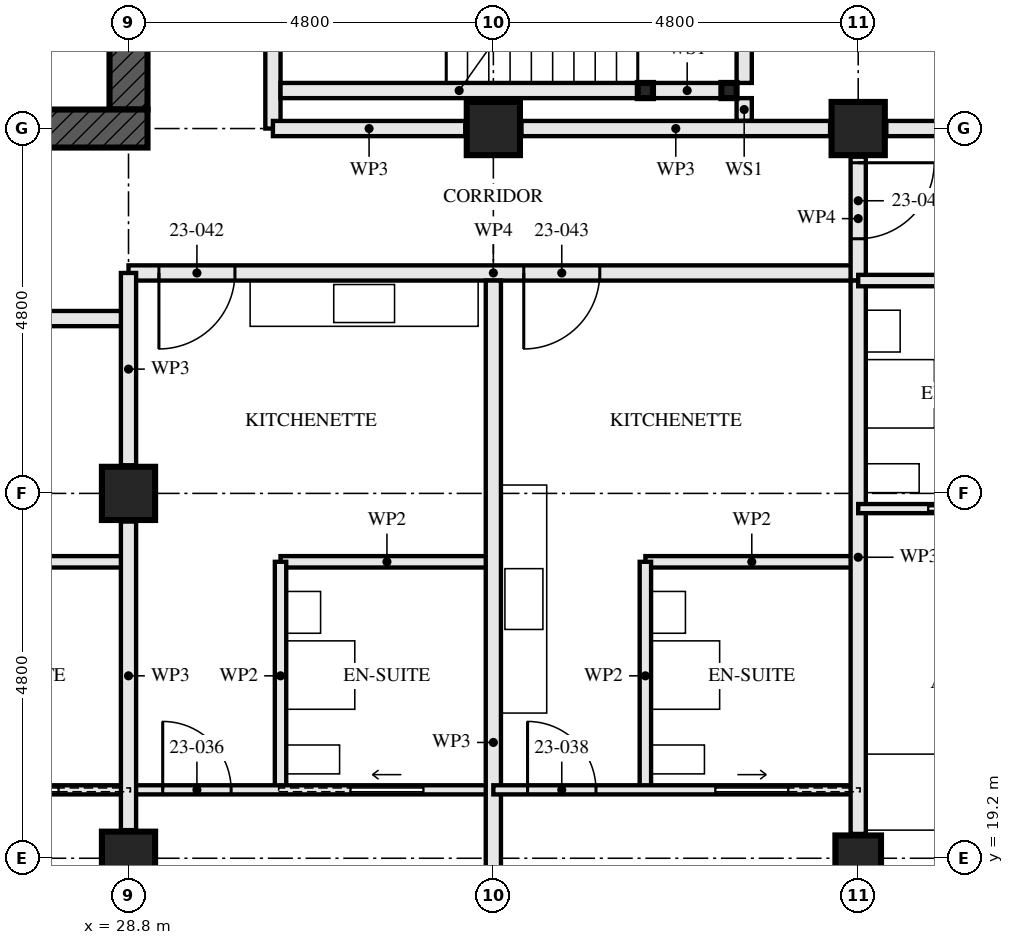
"""IFC4 building model, lengths in metres.
Left out: names, types, materials, properties, quantities, classifications, styles, units other than length and angle.
Written with IfcOpenShell. Run it as: python <this file> out.ifc"""

import sys

from ifc_helpers import new_model, si_unit, direction, frame, frame_2d, origin, origin_2d, place, context, subcontext, project, spatial, rectangle, hollow_rectangle, extrude, element, fill, save


model = new_model("IFC4")
c1 = context("Model", 3, precision=1e-05, world=origin(), true_north=direction((0.0, 1.0)))
c2 = subcontext(c1, "Body", "Model", "MODEL_VIEW")
j1 = project(units=[si_unit("LENGTHUNIT", "METRE"), si_unit("PLANEANGLEUNIT", "RADIAN")], contexts=[c1])
p1 = place(None, origin())
s1 = spatial("IfcSite", under=j1, at=p1, CompositionType="ELEMENT")
p2 = place(p1, origin())
s2 = spatial("IfcBuilding", under=s1, at=p2, CompositionType="ELEMENT")
p3 = place(p2, frame((0.0, 0.0, 87.5)))
s3 = spatial("IfcBuildingStorey", under=s2, at=p3, CompositionType="ELEMENT", Elevation=87.5)
for number, where, z_axis, x_axis in (
    (1, (28.8, 19.2, 0.0), (0.0, 0.0, 1.0), (1.0, 0.0, 0.0)),
    (2, (28.8, 24.0, 0.0), (0.0, 0.0, 1.0), (1.0, 0.0, 0.0)),
    (3, (33.6, 28.8, 0.0), (0.0, 0.0, 1.0), (0.0, 1.0, 0.0)),
):
    element("IfcColumn", number, at=place(p3, frame(where, z_axis=z_axis, x_axis=x_axis)), inside=s3, PredefinedType="COLUMN", context=c2, shape_type="SweptSolid", body=[
        extrude(hollow_rectangle(XDim=0.7, YDim=0.7, WallThickness=0.06, at=origin_2d()), origin(), (0.0, 0.0, 1.0), 3.5),
    ])
p4 = place(p3, frame((38.4, 19.2, 0.0), z_axis=(0.0, 0.0, 1.0), x_axis=(0.0, 1.0, 0.0)))
e4 = element("IfcColumn", 4, at=p4, inside=s3, PredefinedType="COLUMN", context=c2, shape_type="SweptSolid", body=[
    extrude(hollow_rectangle(XDim=0.6, YDim=0.6, WallThickness=0.05, at=origin_2d()), origin(), (0.0, 0.0, 1.0), 3.5),
])
p5 = place(p3, frame((38.4, 28.8, 0.0), z_axis=(0.0, 0.0, 1.0), x_axis=(0.0, 1.0, 0.0)))
e5 = element("IfcColumn", 5, at=p5, inside=s3, PredefinedType="COLUMN", context=c2, shape_type="SweptSolid", body=[
    extrude(hollow_rectangle(XDim=0.7, YDim=0.7, WallThickness=0.06, at=origin_2d()), origin(), (0.0, 0.0, 1.0), 3.5),
])
p6 = place(p3, frame((14.15, 28.8, -0.17), z_axis=(0.0, 0.0, 1.0), x_axis=(1.0, 0.0, 0.0)))
e6 = element("IfcWall", 6, at=p6, inside=s3, PredefinedType="SHEAR", context=c2, shape_type="SweptSolid", body=[
    extrude(rectangle(XDim=14.9, YDim=0.5, at=frame_2d((7.45, 0.0))), origin(), (0.0, 0.0, 1.0), 3.5),
])
p7 = place(p6, frame((6.85, 0.0, 0.17)))
e7 = element("IfcOpeningElement", 7, at=p7, cuts=e6, PredefinedType="OPENING", context=c2, shape_type="SweptSolid", body=[
    extrude(rectangle(XDim=1.2, YDim=2.1, at=frame_2d((0.6, 1.05))), frame((0.0, 0.26, 0.0), z_axis=(0.0, -1.0, 0.0), x_axis=(1.0, 0.0, 0.0)), (0.0, 0.0, 1.0), 0.521),
])
p8 = place(p3, frame((28.8, 29.05, -0.17), z_axis=(0.0, 0.0, 1.0), x_axis=(0.0, 1.0, 0.0)))
e8 = element("IfcWall", 8, at=p8, inside=s3, PredefinedType="SHEAR", context=c2, shape_type="SweptSolid", body=[
    extrude(rectangle(XDim=13.9, YDim=0.5, at=frame_2d((6.95, 0.0))), origin(), (0.0, 0.0, 1.0), 3.5),
])
p9 = place(p8, frame((6.35, 0.0, 0.17)))
e9 = element("IfcOpeningElement", 9, at=p9, cuts=e8, PredefinedType="OPENING", context=c2, shape_type="SweptSolid", body=[
    extrude(rectangle(XDim=1.2, YDim=2.1, at=frame_2d((0.6, 1.05))), frame((0.0, 0.26, 0.0), z_axis=(0.0, -1.0, 0.0), x_axis=(1.0, 0.0, 0.0)), (0.0, 0.0, 1.0), 0.521),
])
for number, where, z_axis, x_axis in (
    (10, (36.7, 29.3, 0.0), (0.0, 0.0, 1.0), (1.0, 0.0, 0.0)),
    (11, (35.6, 29.3, 0.0), (0.0, 0.0, 1.0), (1.0, 0.0, 0.0)),
):
    element("IfcColumn", number, at=place(p3, frame(where, z_axis=z_axis, x_axis=x_axis)), inside=s3, PredefinedType="COLUMN", context=c2, shape_type="SweptSolid", body=[
        extrude(hollow_rectangle(XDim=0.2, YDim=0.2, WallThickness=0.008, at=origin_2d()), origin(), (0.0, 0.0, 1.0), 3.33),
    ])
p10 = place(p3, frame((26.0, 23.1, 0.0), z_axis=(0.0, 0.0, 1.0), x_axis=(1.0, 0.0, 0.0)))
e12 = element("IfcWall", 12, at=p10, inside=s3, PredefinedType="PARTITIONING", context=c2, shape_type="SweptSolid", body=[
    extrude(rectangle(XDim=2.8, YDim=0.15, at=frame_2d((1.4, 0.0))), origin(), (0.0, 0.0, 1.0), 3.33),
])
p11 = place(p3, frame((24.0, 20.1, 0.0), z_axis=(0.0, 0.0, 1.0), x_axis=(1.0, 0.0, 0.0)))
e13 = element("IfcWall", 13, at=p11, inside=s3, PredefinedType="PARTITIONING", context=c2, shape_type="SweptSolid", body=[
    extrude(rectangle(XDim=4.8, YDim=0.12, at=frame_2d((2.4, 0.0))), origin(), (0.0, 0.0, 1.0), 3.33),
])
p12 = place(p11, frame((0.45, 0.0, 0.0)))
e14 = element("IfcOpeningElement", 14, at=p12, cuts=e13, PredefinedType="OPENING", context=c2, shape_type="SweptSolid", body=[
    extrude(rectangle(XDim=0.9, YDim=2.1, at=frame_2d((0.45, 1.05))), frame((0.0, 0.071, 0.0), z_axis=(0.0, -1.0, 0.0), x_axis=(1.0, 0.0, 0.0)), (0.0, 0.0, 1.0), 0.141),
])
p13 = place(p11, frame((2.925, 0.0, 0.0)))
e15 = element("IfcOpeningElement", 15, at=p13, cuts=e13, PredefinedType="OPENING", context=c2, shape_type="SweptSolid", body=[
    extrude(rectangle(XDim=0.95, YDim=2.1, at=frame_2d((0.475, 1.05))), frame((0.0, 0.071, 0.0), z_axis=(0.0, -1.0, 0.0), x_axis=(1.0, 0.0, 0.0)), (0.0, 0.0, 1.0), 0.141),
])
p14 = place(p3, frame((17.8, 26.3, 0.0), z_axis=(0.0, 0.0, 1.0), x_axis=(1.0, 0.0, 0.0)))
e16 = element("IfcWall", 16, at=p14, inside=s3, PredefinedType="PARTITIONING", context=c2, shape_type="SweptSolid", body=[
    extrude(rectangle(XDim=11.0, YDim=0.2, at=frame_2d((5.5, 0.0))), origin(), (0.0, 0.0, 1.0), 2.55),
])
p15 = place(p14, frame((0.25, 0.0, 0.0)))
e17 = element("IfcOpeningElement", 17, at=p15, cuts=e16, PredefinedType="OPENING", context=c2, shape_type="SweptSolid", body=[
    extrude(rectangle(XDim=0.9, YDim=2.1, at=frame_2d((0.45, 1.05))), frame((0.0, 0.111, 0.0), z_axis=(0.0, -1.0, 0.0), x_axis=(1.0, 0.0, 0.0)), (0.0, 0.0, 1.0), 0.221),
])
p16 = place(p14, frame((1.8, 0.0, 0.0)))
e18 = element("IfcOpeningElement", 18, at=p16, cuts=e16, PredefinedType="OPENING", context=c2, shape_type="SweptSolid", body=[
    extrude(rectangle(XDim=1.0, YDim=2.1, at=frame_2d((0.5, 1.05))), frame((0.0, 0.111, 0.0), z_axis=(0.0, -1.0, 0.0), x_axis=(1.0, 0.0, 0.0)), (0.0, 0.0, 1.0), 0.221),
])
p17 = place(p14, frame((6.6, 0.0, 0.0)))
e19 = element("IfcOpeningElement", 19, at=p17, cuts=e16, PredefinedType="OPENING", context=c2, shape_type="SweptSolid", body=[
    extrude(rectangle(XDim=1.0, YDim=2.1, at=frame_2d((0.5, 1.05))), frame((0.0, 0.111, 0.0), z_axis=(0.0, -1.0, 0.0), x_axis=(1.0, 0.0, 0.0)), (0.0, 0.0, 1.0), 0.221),
])
p18 = place(p3, frame((30.8, 20.1, 0.0), z_axis=(0.0, 0.0, 1.0), x_axis=(0.0, 1.0, 0.0)))
e20 = element("IfcWall", 20, at=p18, inside=s3, PredefinedType="PARTITIONING", context=c2, shape_type="SweptSolid", body=[
    extrude(rectangle(XDim=3.0, YDim=0.15, at=frame_2d((1.5, 0.0))), origin(), (0.0, 0.0, 1.0), 3.33),
])
p19 = place(p3, frame((30.8, 23.1, 0.0), z_axis=(0.0, 0.0, 1.0), x_axis=(1.0, 0.0, 0.0)))
e21 = element("IfcWall", 21, at=p19, inside=s3, PredefinedType="PARTITIONING", context=c2, shape_type="SweptSolid", body=[
    extrude(rectangle(XDim=2.8, YDim=0.15, at=frame_2d((1.4, 0.0))), origin(), (0.0, 0.0, 1.0), 3.33),
])
p20 = place(p3, frame((28.8, 20.1, 0.0), z_axis=(0.0, 0.0, 1.0), x_axis=(1.0, 0.0, 0.0)))
e22 = element("IfcWall", 22, at=p20, inside=s3, PredefinedType="PARTITIONING", context=c2, shape_type="SweptSolid", body=[
    extrude(rectangle(XDim=4.8, YDim=0.12, at=frame_2d((2.4, 0.0))), origin(), (0.0, 0.0, 1.0), 3.33),
])
p21 = place(p20, frame((0.45, 0.0, 0.0)))
e23 = element("IfcOpeningElement", 23, at=p21, cuts=e22, PredefinedType="OPENING", context=c2, shape_type="SweptSolid", body=[
    extrude(rectangle(XDim=0.9, YDim=2.1, at=frame_2d((0.45, 1.05))), frame((0.0, 0.071, 0.0), z_axis=(0.0, -1.0, 0.0), x_axis=(1.0, 0.0, 0.0)), (0.0, 0.0, 1.0), 0.141),
])
p22 = place(p20, frame((2.925, 0.0, 0.0)))
e24 = element("IfcOpeningElement", 24, at=p22, cuts=e22, PredefinedType="OPENING", context=c2, shape_type="SweptSolid", body=[
    extrude(rectangle(XDim=0.95, YDim=2.1, at=frame_2d((0.475, 1.05))), frame((0.0, 0.071, 0.0), z_axis=(0.0, -1.0, 0.0), x_axis=(1.0, 0.0, 0.0)), (0.0, 0.0, 1.0), 0.141),
])
p23 = place(p3, frame((33.6, 14.647, 0.0), z_axis=(0.0, 0.0, 1.0), x_axis=(0.0, 1.0, 0.0)))
e25 = element("IfcWall", 25, at=p23, inside=s3, PredefinedType="PARTITIONING", context=c2, shape_type="SweptSolid", body=[
    extrude(rectangle(XDim=12.153, YDim=0.2, at=frame_2d((6.077, 0.0))), origin(), (0.0, 0.0, 1.0), 2.55),
])
p24 = place(p3, frame((35.6, 20.1, 0.0), z_axis=(0.0, 0.0, 1.0), x_axis=(0.0, 1.0, 0.0)))
e26 = element("IfcWall", 26, at=p24, inside=s3, PredefinedType="PARTITIONING", context=c2, shape_type="SweptSolid", body=[
    extrude(rectangle(XDim=3.0, YDim=0.15, at=frame_2d((1.5, 0.0))), origin(), (0.0, 0.0, 1.0), 3.33),
])
p25 = place(p3, frame((35.6, 23.1, 0.0), z_axis=(0.0, 0.0, 1.0), x_axis=(1.0, 0.0, 0.0)))
e27 = element("IfcWall", 27, at=p25, inside=s3, PredefinedType="PARTITIONING", context=c2, shape_type="SweptSolid", body=[
    extrude(rectangle(XDim=2.8, YDim=0.15, at=frame_2d((1.4, 0.0))), origin(), (0.0, 0.0, 1.0), 3.33),
])
p26 = place(p3, frame((33.6, 20.1, 0.0), z_axis=(0.0, 0.0, 1.0), x_axis=(1.0, 0.0, 0.0)))
e28 = element("IfcWall", 28, at=p26, inside=s3, PredefinedType="PARTITIONING", context=c2, shape_type="SweptSolid", body=[
    extrude(rectangle(XDim=4.8, YDim=0.12, at=frame_2d((2.4, 0.0))), origin(), (0.0, 0.0, 1.0), 3.33),
])
p27 = place(p26, frame((0.45, 0.0, 0.0)))
e29 = element("IfcOpeningElement", 29, at=p27, cuts=e28, PredefinedType="OPENING", context=c2, shape_type="SweptSolid", body=[
    extrude(rectangle(XDim=0.9, YDim=2.1, at=frame_2d((0.45, 1.05))), frame((0.0, 0.071, 0.0), z_axis=(0.0, -1.0, 0.0), x_axis=(1.0, 0.0, 0.0)), (0.0, 0.0, 1.0), 0.141),
])
p28 = place(p26, frame((2.925, 0.0, 0.0)))
e30 = element("IfcOpeningElement", 30, at=p28, cuts=e28, PredefinedType="OPENING", context=c2, shape_type="SweptSolid", body=[
    extrude(rectangle(XDim=0.95, YDim=2.1, at=frame_2d((0.475, 1.05))), frame((0.0, 0.071, 0.0), z_axis=(0.0, -1.0, 0.0), x_axis=(1.0, 0.0, 0.0)), (0.0, 0.0, 1.0), 0.141),
])
p29 = place(p3, frame((38.4, 19.52, 0.0), z_axis=(0.0, 0.0, 1.0), x_axis=(0.0, 1.0, 0.0)))
e31 = element("IfcWall", 31, at=p29, inside=s3, PredefinedType="PARTITIONING", context=c2, shape_type="SweptSolid", body=[
    extrude(rectangle(XDim=7.28, YDim=0.2, at=frame_2d((3.64, 0.0))), origin(), (0.0, 0.0, 1.0), 2.55),
])
p30 = place(p3, frame((38.4, 26.8, 0.0), z_axis=(0.0, 0.0, 1.0), x_axis=(1.0, 0.0, 0.0)))
e32 = element("IfcWall", 32, at=p30, inside=s3, PredefinedType="PARTITIONING", context=c2, shape_type="SweptSolid", body=[
    extrude(rectangle(XDim=2.8, YDim=0.15, at=frame_2d((1.4, 0.0))), origin(), (0.0, 0.0, 1.0), 3.33),
])
p31 = place(p3, frame((38.4, 23.8, 0.0), z_axis=(0.0, 0.0, 1.0), x_axis=(1.0, 0.0, 0.0)))
e33 = element("IfcWall", 33, at=p31, inside=s3, PredefinedType="PARTITIONING", context=c2, shape_type="SweptSolid", body=[
    extrude(rectangle(XDim=4.553, YDim=0.12, at=frame_2d((2.276, 0.0))), origin(), (0.0, 0.0, 1.0), 3.33),
])
p32 = place(p31, frame((2.975, 0.0, 0.0)))
e34 = element("IfcOpeningElement", 34, at=p32, cuts=e33, PredefinedType="OPENING", context=c2, shape_type="SweptSolid", body=[
    extrude(rectangle(XDim=0.9, YDim=2.1, at=frame_2d((0.45, 1.05))), frame((0.0, 0.071, 0.0), z_axis=(0.0, -1.0, 0.0), x_axis=(1.0, 0.0, 0.0)), (0.0, 0.0, 1.0), 0.141),
])
p33 = place(p31, frame((0.925, 0.0, 0.0)))
e35 = element("IfcOpeningElement", 35, at=p33, cuts=e33, PredefinedType="OPENING", context=c2, shape_type="SweptSolid", body=[
    extrude(rectangle(XDim=0.95, YDim=2.1, at=frame_2d((0.475, 1.05))), frame((0.0, 0.071, 0.0), z_axis=(0.0, -1.0, 0.0), x_axis=(1.0, 0.0, 0.0)), (0.0, 0.0, 1.0), 0.141),
])
p34 = place(p3, frame((28.8, 26.9, 0.0), z_axis=(0.0, 0.0, 1.0), x_axis=(1.0, 0.0, 0.0)))
e36 = element("IfcWall", 36, at=p34, inside=s3, PredefinedType="PARTITIONING", context=c2, shape_type="SweptSolid", body=[
    extrude(rectangle(XDim=9.6, YDim=0.2, at=frame_2d((4.8, 0.0))), origin(), (0.0, 0.0, 1.0), 3.33),
])
p35 = place(p34, frame((0.4, 0.0, 0.0)))
e37 = element("IfcOpeningElement", 37, at=p35, cuts=e36, PredefinedType="OPENING", context=c2, shape_type="SweptSolid", body=[
    extrude(rectangle(XDim=1.0, YDim=2.1, at=frame_2d((0.5, 1.05))), frame((0.0, 0.111, 0.0), z_axis=(0.0, -1.0, 0.0), x_axis=(1.0, 0.0, 0.0)), (0.0, 0.0, 1.0), 0.221),
])
p36 = place(p34, frame((5.2, 0.0, 0.0)))
e38 = element("IfcOpeningElement", 38, at=p36, cuts=e36, PredefinedType="OPENING", context=c2, shape_type="SweptSolid", body=[
    extrude(rectangle(XDim=1.0, YDim=2.1, at=frame_2d((0.5, 1.05))), frame((0.0, 0.111, 0.0), z_axis=(0.0, -1.0, 0.0), x_axis=(1.0, 0.0, 0.0)), (0.0, 0.0, 1.0), 0.221),
])
p37 = place(p3, frame((38.4, 26.8, 0.0), z_axis=(0.0, 0.0, 1.0), x_axis=(0.0, 1.0, 0.0)))
e39 = element("IfcWall", 39, at=p37, inside=s3, PredefinedType="PARTITIONING", context=c2, shape_type="SweptSolid", body=[
    extrude(rectangle(XDim=1.63, YDim=0.2, at=frame_2d((0.815, 0.0))), origin(), (0.0, 0.0, 1.0), 3.33),
])
p38 = place(p37, frame((0.55, 0.0, 0.0)))
e40 = element("IfcOpeningElement", 40, at=p38, cuts=e39, PredefinedType="OPENING", context=c2, shape_type="SweptSolid", body=[
    extrude(rectangle(XDim=1.0, YDim=2.1, at=frame_2d((0.5, 1.05))), frame((0.0, 0.111, 0.0), z_axis=(0.0, -1.0, 0.0), x_axis=(1.0, 0.0, 0.0)), (0.0, 0.0, 1.0), 0.221),
])
p39 = place(p3, frame((36.6, 29.3, 0.0), z_axis=(0.0, 0.0, 1.0), x_axis=(-1.0, 0.0, 0.0)))
e41 = element("IfcWall", 41, at=p39, inside=s3, PredefinedType="SOLIDWALL", context=c2, shape_type="SweptSolid", body=[
    extrude(rectangle(XDim=0.9, YDim=0.2, at=frame_2d((0.45, 0.0))), origin(), (0.0, 0.0, 1.0), 2.99),
])
p40 = place(p3, frame((35.5, 29.3, 0.0), z_axis=(0.0, 0.0, 1.0), x_axis=(-1.0, 0.0, 0.0)))
e42 = element("IfcWall", 42, at=p40, inside=s3, PredefinedType="SOLIDWALL", context=c2, shape_type="SweptSolid", body=[
    extrude(rectangle(XDim=4.7, YDim=0.2, at=frame_2d((2.35, 0.0))), origin(), (0.0, 0.0, 1.0), 2.99),
])
p41 = place(p3, frame((36.9, 28.9, 0.0), z_axis=(0.0, 0.0, 1.0), x_axis=(0.0, 1.0, 0.0)))
e43 = element("IfcWall", 43, at=p41, inside=s3, PredefinedType="SOLIDWALL", context=c2, shape_type="SweptSolid", body=[
    extrude(rectangle(XDim=0.3, YDim=0.2, at=frame_2d((0.15, 0.0))), origin(), (0.0, 0.0, 1.0), 3.33),
])
p42 = place(p3, frame((36.9, 29.4, 0.0), z_axis=(0.0, 0.0, 1.0), x_axis=(0.0, 1.0, 0.0)))
e44 = element("IfcWall", 44, at=p42, inside=s3, PredefinedType="SOLIDWALL", context=c2, shape_type="SweptSolid", body=[
    extrude(rectangle(XDim=2.6, YDim=0.2, at=frame_2d((1.3, 0.0))), origin(), (0.0, 0.0, 1.0), 3.33),
])
p43 = place(p3, frame((30.7, 28.8, 0.0), z_axis=(0.0, 0.0, 1.0), x_axis=(0.0, 1.0, 0.0)))
e45 = element("IfcWall", 45, at=p43, inside=s3, PredefinedType="PARTITIONING", context=c2, shape_type="SweptSolid", body=[
    extrude(rectangle(XDim=14.84, YDim=0.2, at=frame_2d((7.42, 0.0))), origin(), (0.0, 0.0, 1.0), 2.32),
])
p44 = place(p43, frame((1.4, 0.0, 0.0)))
e46 = element("IfcOpeningElement", 46, at=p44, cuts=e45, PredefinedType="OPENING", context=c2, shape_type="SweptSolid", body=[
    extrude(rectangle(XDim=1.0, YDim=2.1, at=frame_2d((0.5, 1.05))), frame((0.0, 0.111, 0.0), z_axis=(0.0, -1.0, 0.0), x_axis=(1.0, 0.0, 0.0)), (0.0, 0.0, 1.0), 0.221),
])
p45 = place(p43, frame((4.1, 0.0, 0.0)))
e47 = element("IfcOpeningElement", 47, at=p45, cuts=e45, PredefinedType="OPENING", context=c2, shape_type="SweptSolid", body=[
    extrude(rectangle(XDim=1.0, YDim=2.1, at=frame_2d((0.5, 1.05))), frame((0.0, 0.111, 0.0), z_axis=(0.0, -1.0, 0.0), x_axis=(1.0, 0.0, 0.0)), (0.0, 0.0, 1.0), 0.221),
])
p46 = place(p43, frame((5.975, 0.0, 0.0)))
e48 = element("IfcOpeningElement", 48, at=p46, cuts=e45, PredefinedType="OPENING", context=c2, shape_type="SweptSolid", body=[
    extrude(rectangle(XDim=1.0, YDim=2.1, at=frame_2d((0.5, 1.05))), frame((0.0, 0.111, 0.0), z_axis=(0.0, -1.0, 0.0), x_axis=(1.0, 0.0, 0.0)), (0.0, 0.0, 1.0), 0.221),
])
p47 = place(p43, frame((13.0, 0.0, 0.0)))
e49 = element("IfcOpeningElement", 49, at=p47, cuts=e45, PredefinedType="OPENING", context=c2, shape_type="SweptSolid", body=[
    extrude(rectangle(XDim=1.0, YDim=2.1, at=frame_2d((0.5, 1.05))), frame((0.0, 0.111, 0.0), z_axis=(0.0, -1.0, 0.0), x_axis=(1.0, 0.0, 0.0)), (0.0, 0.0, 1.0), 0.221),
])
p48 = place(p3, frame((28.8, 19.57, 0.0), z_axis=(0.0, 0.0, 1.0), x_axis=(0.0, 1.0, 0.0)))
e50 = element("IfcWall", 50, at=p48, inside=s3, PredefinedType="PARTITIONING", context=c2, shape_type="SweptSolid", body=[
    extrude(rectangle(XDim=4.06, YDim=0.2, at=frame_2d((2.03, 0.0))), origin(), (0.0, 0.0, 1.0), 2.32),
])
p49 = place(p3, frame((28.8, 24.37, 0.0), z_axis=(0.0, 0.0, 1.0), x_axis=(0.0, 1.0, 0.0)))
e51 = element("IfcWall", 51, at=p49, inside=s3, PredefinedType="PARTITIONING", context=c2, shape_type="SweptSolid", body=[
    extrude(rectangle(XDim=2.53, YDim=0.2, at=frame_2d((1.265, 0.0))), origin(), (0.0, 0.0, 1.0), 2.32),
])
p50 = place(p3, frame((42.896, 28.8, 0.0), z_axis=(0.0, 0.0, 1.0), x_axis=(-1.0, 0.0, 0.0)))
e52 = element("IfcWall", 52, at=p50, inside=s3, PredefinedType="PARTITIONING", context=c2, shape_type="SweptSolid", body=[
    extrude(rectangle(XDim=4.125, YDim=0.2, at=frame_2d((2.063, 0.0))), origin(), (0.0, 0.0, 1.0), 2.32),
])
p51 = place(p3, frame((38.03, 28.8, 0.0), z_axis=(0.0, 0.0, 1.0), x_axis=(-1.0, 0.0, 0.0)))
e53 = element("IfcWall", 53, at=p51, inside=s3, PredefinedType="PARTITIONING", context=c2, shape_type="SweptSolid", body=[
    extrude(rectangle(XDim=4.06, YDim=0.2, at=frame_2d((2.03, 0.0))), origin(), (0.0, 0.0, 1.0), 2.32),
])
p52 = place(p3, frame((33.23, 28.8, 0.0), z_axis=(0.0, 0.0, 1.0), x_axis=(-1.0, 0.0, 0.0)))
e54 = element("IfcWall", 54, at=p52, inside=s3, PredefinedType="PARTITIONING", context=c2, shape_type="SweptSolid", body=[
    extrude(rectangle(XDim=2.53, YDim=0.2, at=frame_2d((1.265, 0.0))), origin(), (0.0, 0.0, 1.0), 2.32),
])
p53 = place(p13, origin())
e55 = element("IfcDoor", 55, at=p53, inside=s3, OperationType="SLIDING_TO_LEFT", PredefinedType="DOOR", context=c2, shape_type="SweptSolid", body=[
    extrude(rectangle(XDim=0.95, YDim=2.1, at=frame_2d((0.475, 1.05))), frame((0.0, 0.022, 0.0), z_axis=(0.0, -1.0, 0.0), x_axis=(1.0, 0.0, 0.0)), (0.0, 0.0, 1.0), 0.044),
])
fill(e15, e55)
p54 = place(p21, origin())
e56 = element("IfcDoor", 56, at=p54, inside=s3, OperationType="SINGLE_SWING_RIGHT", PredefinedType="DOOR", context=c2, shape_type="SweptSolid", body=[
    extrude(rectangle(XDim=0.9, YDim=2.1, at=frame_2d((0.45, 1.05))), frame((0.0, 0.022, 0.0), z_axis=(0.0, -1.0, 0.0), x_axis=(1.0, 0.0, 0.0)), (0.0, 0.0, 1.0), 0.044),
])
fill(e23, e56)
p55 = place(p22, origin())
e57 = element("IfcDoor", 57, at=p55, inside=s3, OperationType="SLIDING_TO_RIGHT", PredefinedType="DOOR", context=c2, shape_type="SweptSolid", body=[
    extrude(rectangle(XDim=0.95, YDim=2.1, at=frame_2d((0.475, 1.05))), frame((0.0, 0.022, 0.0), z_axis=(0.0, -1.0, 0.0), x_axis=(1.0, 0.0, 0.0)), (0.0, 0.0, 1.0), 0.044),
])
fill(e24, e57)
p56 = place(p27, origin())
e58 = element("IfcDoor", 58, at=p56, inside=s3, OperationType="SINGLE_SWING_RIGHT", PredefinedType="DOOR", context=c2, shape_type="SweptSolid", body=[
    extrude(rectangle(XDim=0.9, YDim=2.1, at=frame_2d((0.45, 1.05))), frame((0.0, 0.022, 0.0), z_axis=(0.0, -1.0, 0.0), x_axis=(1.0, 0.0, 0.0)), (0.0, 0.0, 1.0), 0.044),
])
fill(e29, e58)
p57 = place(p28, origin())
e59 = element("IfcDoor", 59, at=p57, inside=s3, OperationType="SLIDING_TO_LEFT", PredefinedType="DOOR", context=c2, shape_type="SweptSolid", body=[
    extrude(rectangle(XDim=0.95, YDim=2.1, at=frame_2d((0.475, 1.05))), frame((0.0, 0.022, 0.0), z_axis=(0.0, -1.0, 0.0), x_axis=(1.0, 0.0, 0.0)), (0.0, 0.0, 1.0), 0.044),
])
fill(e30, e59)
p58 = place(p33, origin())
e60 = element("IfcDoor", 60, at=p58, inside=s3, OperationType="SLIDING_TO_LEFT", PredefinedType="DOOR", context=c2, shape_type="SweptSolid", body=[
    extrude(rectangle(XDim=0.95, YDim=2.1, at=frame_2d((0.475, 1.05))), frame((0.0, 0.022, 0.0), z_axis=(0.0, -1.0, 0.0), x_axis=(1.0, 0.0, 0.0)), (0.0, 0.0, 1.0), 0.044),
])
fill(e35, e60)
p59 = place(p35, frame((1.0, 0.0, 0.0), z_axis=(0.0, 0.0, 1.0), x_axis=(-1.0, 0.0, 0.0)))
e61 = element("IfcDoor", 61, at=p59, inside=s3, OperationType="SINGLE_SWING_LEFT", PredefinedType="DOOR", context=c2, shape_type="SweptSolid", body=[
    extrude(rectangle(XDim=1.0, YDim=2.1, at=frame_2d((0.5, 1.05))), frame((0.0, 0.027, 0.0), z_axis=(0.0, -1.0, 0.0), x_axis=(1.0, 0.0, 0.0)), (0.0, 0.0, 1.0), 0.054),
])
fill(e37, e61)
p60 = place(p36, frame((1.0, 0.0, 0.0), z_axis=(0.0, 0.0, 1.0), x_axis=(-1.0, 0.0, 0.0)))
e62 = element("IfcDoor", 62, at=p60, inside=s3, OperationType="SINGLE_SWING_LEFT", PredefinedType="DOOR", context=c2, shape_type="SweptSolid", body=[
    extrude(rectangle(XDim=1.0, YDim=2.1, at=frame_2d((0.5, 1.05))), frame((0.0, 0.027, 0.0), z_axis=(0.0, -1.0, 0.0), x_axis=(1.0, 0.0, 0.0)), (0.0, 0.0, 1.0), 0.054),
])
fill(e38, e62)
p61 = place(p38, frame((1.0, 0.0, 0.0), z_axis=(0.0, 0.0, 1.0), x_axis=(-1.0, 0.0, 0.0)))
e63 = element("IfcDoor", 63, at=p61, inside=s3, OperationType="SINGLE_SWING_RIGHT", PredefinedType="DOOR", context=c2, shape_type="SweptSolid", body=[
    extrude(rectangle(XDim=1.0, YDim=2.1, at=frame_2d((0.5, 1.05))), frame((0.0, 0.027, 0.0), z_axis=(0.0, -1.0, 0.0), x_axis=(1.0, 0.0, 0.0)), (0.0, 0.0, 1.0), 0.054),
])
fill(e40, e63)
save(model, sys.argv[1])
